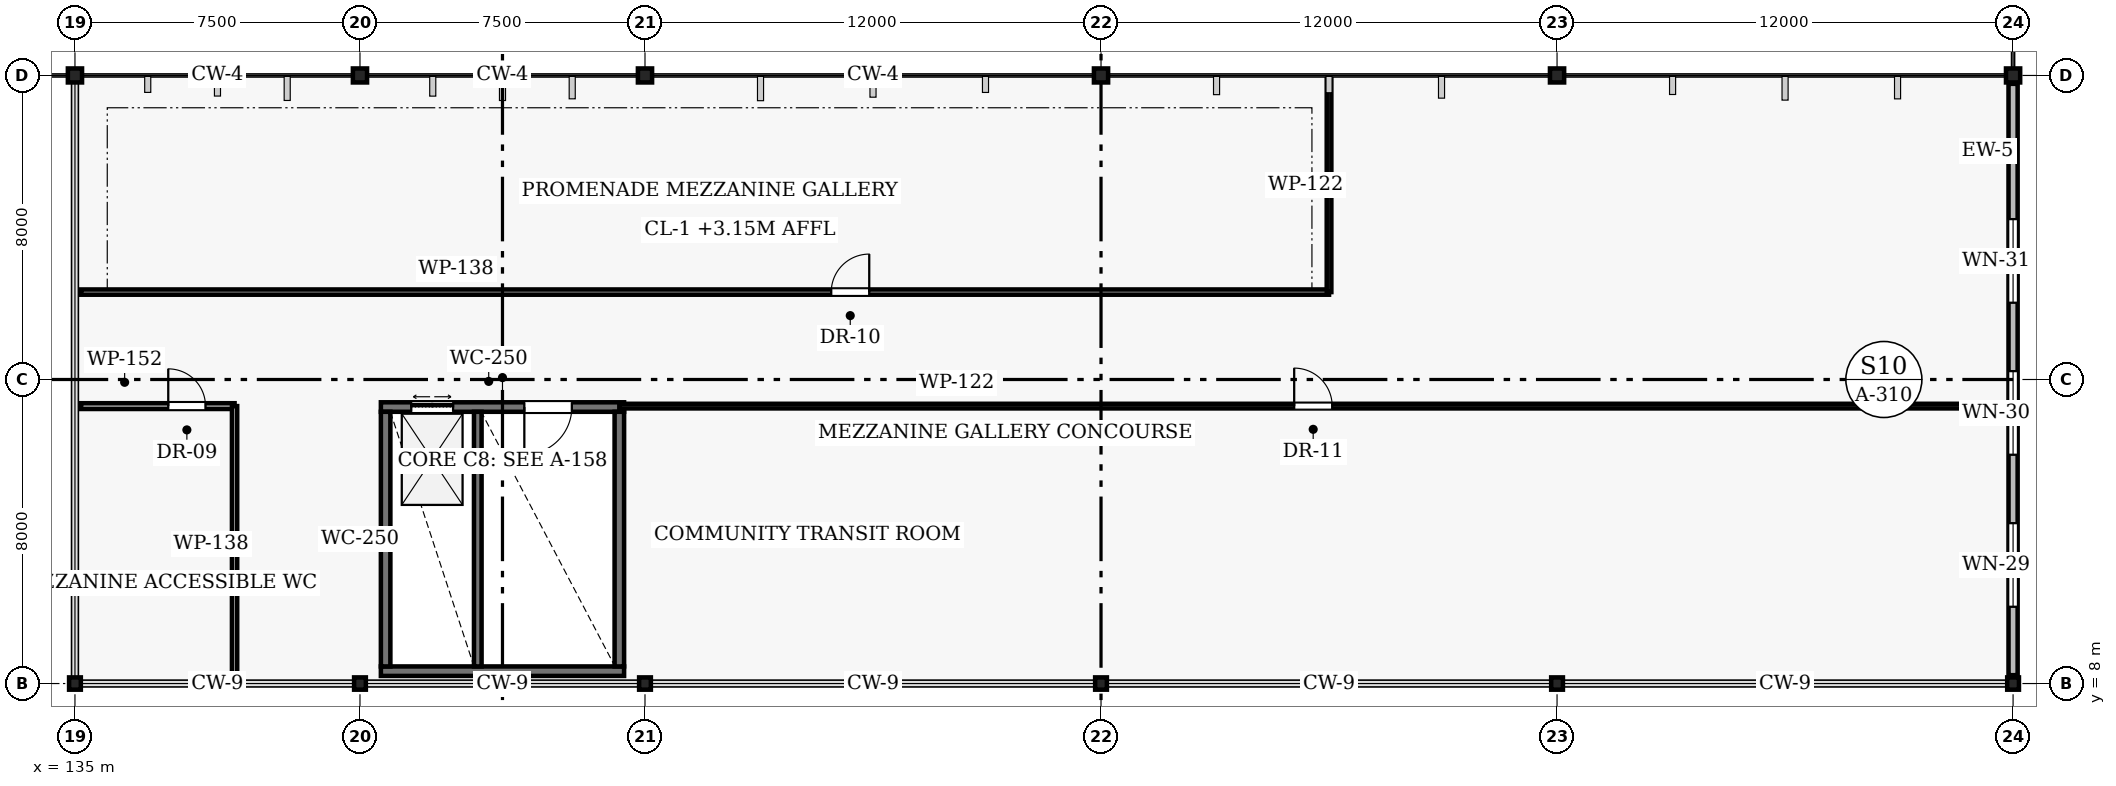
"""IFC4 building model, lengths in metres.
Left out: names, types, materials, properties, quantities, classifications, styles, units other than length and angle.
Written with IfcOpenShell. Run it as: python <this file> out.ifc"""

import sys

from ifc_helpers import new_model, si_unit, direction, frame, frame_2d, origin, origin_2d, place, context, subcontext, project, spatial, rectangle, i_section, extrude, element, fill, save


model = new_model("IFC4")
c1 = context("Model", 3, precision=1e-05, world=origin(), true_north=direction((0.0, 1.0)))
c2 = subcontext(c1, "Body", "Model", "MODEL_VIEW")
j1 = project(units=[si_unit("LENGTHUNIT", "METRE"), si_unit("PLANEANGLEUNIT", "RADIAN")], contexts=[c1])
p1 = place(None, origin())
s1 = spatial("IfcSite", under=j1, at=p1, CompositionType="ELEMENT")
p2 = place(p1, origin())
s2 = spatial("IfcBuilding", under=s1, at=p2, CompositionType="ELEMENT")
p3 = place(p2, frame((0.0, 0.0, 4.5)))
s3 = spatial("IfcBuildingStorey", under=s2, at=p3, CompositionType="ELEMENT", Elevation=4.5)
p4 = place(p3, frame((135.0, 8.0, 0.0), z_axis=(0.0, 0.0, 1.0), x_axis=(1.0, 0.0, 0.0)))
e1 = element("IfcColumn", 1, at=p4, inside=s3, PredefinedType="COLUMN", context=c2, shape_type="SweptSolid", body=[
    extrude(i_section(OverallWidth=0.309, OverallDepth=0.323, WebThickness=0.014, FlangeThickness=0.023, FilletRadius=0.015, at=origin_2d()), origin(), (0.0, 0.0, 1.0), 4.28),
])
p5 = place(p3, frame((135.0, 24.0, 0.0), z_axis=(0.0, 0.0, 1.0), x_axis=(1.0, 0.0, 0.0)))
e2 = element("IfcColumn", 2, at=p5, inside=s3, PredefinedType="COLUMN", context=c2, shape_type="SweptSolid", body=[
    extrude(i_section(OverallWidth=0.373, OverallDepth=0.368, WebThickness=0.015, FlangeThickness=0.024, FilletRadius=0.015, at=origin_2d()), origin(), (0.0, 0.0, 1.0), 4.5),
])
p6 = place(p3, frame((142.5, 8.0, 0.0), z_axis=(0.0, 0.0, 1.0), x_axis=(1.0, 0.0, 0.0)))
e3 = element("IfcColumn", 3, at=p6, inside=s3, PredefinedType="COLUMN", context=c2, shape_type="SweptSolid", body=[
    extrude(i_section(OverallWidth=0.309, OverallDepth=0.323, WebThickness=0.014, FlangeThickness=0.023, FilletRadius=0.015, at=origin_2d()), origin(), (0.0, 0.0, 1.0), 4.28),
])
p7 = place(p3, frame((142.5, 24.0, 0.0), z_axis=(0.0, 0.0, 1.0), x_axis=(1.0, 0.0, 0.0)))
e4 = element("IfcColumn", 4, at=p7, inside=s3, PredefinedType="COLUMN", context=c2, shape_type="SweptSolid", body=[
    extrude(i_section(OverallWidth=0.373, OverallDepth=0.368, WebThickness=0.015, FlangeThickness=0.024, FilletRadius=0.015, at=origin_2d()), origin(), (0.0, 0.0, 1.0), 4.5),
])
p8 = place(p3, frame((150.0, 8.0, 0.0), z_axis=(0.0, 0.0, 1.0), x_axis=(1.0, 0.0, 0.0)))
e5 = element("IfcColumn", 5, at=p8, inside=s3, PredefinedType="COLUMN", context=c2, shape_type="SweptSolid", body=[
    extrude(i_section(OverallWidth=0.309, OverallDepth=0.323, WebThickness=0.014, FlangeThickness=0.023, FilletRadius=0.015, at=origin_2d()), origin(), (0.0, 0.0, 1.0), 4.28),
])
p9 = place(p3, frame((150.0, 24.0, 0.0), z_axis=(0.0, 0.0, 1.0), x_axis=(1.0, 0.0, 0.0)))
e6 = element("IfcColumn", 6, at=p9, inside=s3, PredefinedType="COLUMN", context=c2, shape_type="SweptSolid", body=[
    extrude(i_section(OverallWidth=0.373, OverallDepth=0.368, WebThickness=0.015, FlangeThickness=0.024, FilletRadius=0.015, at=origin_2d()), origin(), (0.0, 0.0, 1.0), 4.5),
])
p10 = place(p3, frame((162.0, 8.0, 0.0), z_axis=(0.0, 0.0, 1.0), x_axis=(1.0, 0.0, 0.0)))
e7 = element("IfcColumn", 7, at=p10, inside=s3, PredefinedType="COLUMN", context=c2, shape_type="SweptSolid", body=[
    extrude(i_section(OverallWidth=0.309, OverallDepth=0.323, WebThickness=0.014, FlangeThickness=0.023, FilletRadius=0.015, at=origin_2d()), origin(), (0.0, 0.0, 1.0), 4.28),
])
p11 = place(p3, frame((162.0, 24.0, 0.0), z_axis=(0.0, 0.0, 1.0), x_axis=(1.0, 0.0, 0.0)))
e8 = element("IfcColumn", 8, at=p11, inside=s3, PredefinedType="COLUMN", context=c2, shape_type="SweptSolid", body=[
    extrude(i_section(OverallWidth=0.373, OverallDepth=0.368, WebThickness=0.015, FlangeThickness=0.024, FilletRadius=0.015, at=origin_2d()), origin(), (0.0, 0.0, 1.0), 4.5),
])
p12 = place(p3, frame((174.0, 8.0, 0.0), z_axis=(0.0, 0.0, 1.0), x_axis=(1.0, 0.0, 0.0)))
e9 = element("IfcColumn", 9, at=p12, inside=s3, PredefinedType="COLUMN", context=c2, shape_type="SweptSolid", body=[
    extrude(i_section(OverallWidth=0.309, OverallDepth=0.323, WebThickness=0.014, FlangeThickness=0.023, FilletRadius=0.015, at=origin_2d()), origin(), (0.0, 0.0, 1.0), 4.28),
])
p13 = place(p3, frame((174.0, 24.0, 0.0), z_axis=(0.0, 0.0, 1.0), x_axis=(1.0, 0.0, 0.0)))
e10 = element("IfcColumn", 10, at=p13, inside=s3, PredefinedType="COLUMN", context=c2, shape_type="SweptSolid", body=[
    extrude(i_section(OverallWidth=0.373, OverallDepth=0.368, WebThickness=0.015, FlangeThickness=0.024, FilletRadius=0.015, at=origin_2d()), origin(), (0.0, 0.0, 1.0), 4.5),
])
p14 = place(p3, frame((186.0, 8.0, 0.0), z_axis=(0.0, 0.0, 1.0), x_axis=(1.0, 0.0, 0.0)))
e11 = element("IfcColumn", 11, at=p14, inside=s3, PredefinedType="COLUMN", context=c2, shape_type="SweptSolid", body=[
    extrude(i_section(OverallWidth=0.309, OverallDepth=0.323, WebThickness=0.014, FlangeThickness=0.023, FilletRadius=0.015, at=origin_2d()), origin(), (0.0, 0.0, 1.0), 4.28),
])
p15 = place(p3, frame((186.0, 24.0, 0.0), z_axis=(0.0, 0.0, 1.0), x_axis=(1.0, 0.0, 0.0)))
e12 = element("IfcColumn", 12, at=p15, inside=s3, PredefinedType="COLUMN", context=c2, shape_type="SweptSolid", body=[
    extrude(i_section(OverallWidth=0.373, OverallDepth=0.368, WebThickness=0.015, FlangeThickness=0.024, FilletRadius=0.015, at=origin_2d()), origin(), (0.0, 0.0, 1.0), 4.5),
])
p16 = place(p3, frame((186.0, 8.22, 0.0), z_axis=(0.0, 0.0, 1.0), x_axis=(0.0, 1.0, 0.0)))
e13 = element("IfcWall", 13, at=p16, inside=s3, PredefinedType="SOLIDWALL", context=c2, shape_type="SweptSolid", body=[
    extrude(rectangle(XDim=15.56, YDim=0.24, at=frame_2d((7.78, 0.0))), origin(), (0.0, 0.0, 1.0), 3.581),
])
p17 = place(p16, frame((1.8, 0.0, 1.05)))
e14 = element("IfcOpeningElement", 14, at=p17, cuts=e13, PredefinedType="OPENING", context=c2, shape_type="SweptSolid", body=[
    extrude(rectangle(XDim=2.2, YDim=1.2, at=frame_2d((1.1, 0.6))), frame((0.0, 0.13, 0.0), z_axis=(0.0, -1.0, 0.0), x_axis=(1.0, 0.0, 0.0)), (0.0, 0.0, 1.0), 0.26),
])
p18 = place(p16, frame((5.8, 0.0, 1.05)))
e15 = element("IfcOpeningElement", 15, at=p18, cuts=e13, PredefinedType="OPENING", context=c2, shape_type="SweptSolid", body=[
    extrude(rectangle(XDim=2.2, YDim=1.5, at=frame_2d((1.1, 0.75))), frame((0.0, 0.13, 0.0), z_axis=(0.0, -1.0, 0.0), x_axis=(1.0, 0.0, 0.0)), (0.0, 0.0, 1.0), 0.26),
])
p19 = place(p16, frame((9.8, 0.0, 1.05)))
e16 = element("IfcOpeningElement", 16, at=p19, cuts=e13, PredefinedType="OPENING", context=c2, shape_type="SweptSolid", body=[
    extrude(rectangle(XDim=2.2, YDim=1.65, at=frame_2d((1.1, 0.825))), frame((0.0, 0.13, 0.0), z_axis=(0.0, -1.0, 0.0), x_axis=(1.0, 0.0, 0.0)), (0.0, 0.0, 1.0), 0.26),
])
p20 = place(p3, frame((143.05, 8.325, 0.0), z_axis=(0.0, 0.0, 1.0), x_axis=(1.0, 0.0, 0.0)))
e17 = element("IfcWall", 17, at=p20, inside=s3, PredefinedType="SHEAR", context=c2, shape_type="SweptSolid", body=[
    extrude(rectangle(XDim=6.4, YDim=0.25, at=frame_2d((3.2, 0.0))), origin(), (0.0, 0.0, 1.0), 3.65),
])
p21 = place(p3, frame((143.05, 15.275, 0.0), z_axis=(0.0, 0.0, 1.0), x_axis=(1.0, 0.0, 0.0)))
e18 = element("IfcWall", 18, at=p21, inside=s3, PredefinedType="SHEAR", context=c2, shape_type="SweptSolid", body=[
    extrude(rectangle(XDim=6.4, YDim=0.25, at=frame_2d((3.2, 0.0))), origin(), (0.0, 0.0, 1.0), 3.65),
])
p22 = place(p21, frame((0.8, 0.0, 0.0)))
e19 = element("IfcOpeningElement", 19, at=p22, cuts=e18, PredefinedType="OPENING", context=c2, shape_type="SweptSolid", body=[
    extrude(rectangle(XDim=1.1, YDim=2.15, at=frame_2d((0.55, 1.075))), frame((0.0, 0.135, 0.0), z_axis=(0.0, -1.0, 0.0), x_axis=(1.0, 0.0, 0.0)), (0.0, 0.0, 1.0), 0.27),
])
p23 = place(p21, frame((3.775, 0.0, 0.0)))
e20 = element("IfcOpeningElement", 20, at=p23, cuts=e18, PredefinedType="OPENING", context=c2, shape_type="SweptSolid", body=[
    extrude(rectangle(XDim=1.25, YDim=2.15, at=frame_2d((0.625, 1.075))), frame((0.0, 0.135, 0.0), z_axis=(0.0, -1.0, 0.0), x_axis=(1.0, 0.0, 0.0)), (0.0, 0.0, 1.0), 0.27),
])
for number, where, z_axis, x_axis in (
    (21, (143.175, 8.45, 0.0), (0.0, 0.0, 1.0), (0.0, 1.0, 0.0)),
    (22, (149.325, 8.45, 0.0), (0.0, 0.0, 1.0), (0.0, 1.0, 0.0)),
):
    element("IfcWall", number, at=place(p3, frame(where, z_axis=z_axis, x_axis=x_axis)), inside=s3, PredefinedType="SHEAR", context=c2, shape_type="SweptSolid", body=[
        extrude(rectangle(XDim=6.7, YDim=0.25, at=frame_2d((3.35, 0.0))), origin(), (0.0, 0.0, 1.0), 3.65),
    ])
p24 = place(p3, frame((145.6, 8.45, 0.0), z_axis=(0.0, 0.0, 1.0), x_axis=(0.0, 1.0, 0.0)))
e23 = element("IfcWall", 23, at=p24, inside=s3, PredefinedType="SHEAR", context=c2, shape_type="SweptSolid", body=[
    extrude(rectangle(XDim=6.7, YDim=0.2, at=frame_2d((3.35, 0.0))), origin(), (0.0, 0.0, 1.0), 3.65),
])
p25 = place(p3, frame((135.16, 15.3, 0.0), z_axis=(0.0, 0.0, 1.0), x_axis=(1.0, 0.0, 0.0)))
e24 = element("IfcWall", 24, at=p25, inside=s3, PredefinedType="PARTITIONING", context=c2, shape_type="SweptSolid", body=[
    extrude(rectangle(XDim=4.04, YDim=0.152, at=frame_2d((2.02, 0.0))), origin(), (0.0, 0.0, 1.0), 3.7),
])
p26 = place(p25, frame((2.295, 0.0, 0.0)))
e25 = element("IfcOpeningElement", 25, at=p26, cuts=e24, PredefinedType="OPENING", context=c2, shape_type="SweptSolid", body=[
    extrude(rectangle(XDim=0.98, YDim=2.12, at=frame_2d((0.49, 1.06))), frame((0.0, 0.086, 0.0), z_axis=(0.0, -1.0, 0.0), x_axis=(1.0, 0.0, 0.0)), (0.0, 0.0, 1.0), 0.172),
])
p27 = place(p3, frame((139.2, 8.05, 0.0), z_axis=(0.0, 0.0, 1.0), x_axis=(0.0, 1.0, 0.0)))
e26 = element("IfcWall", 26, at=p27, inside=s3, PredefinedType="PARTITIONING", context=c2, shape_type="SweptSolid", body=[
    extrude(rectangle(XDim=7.25, YDim=0.138, at=frame_2d((3.625, 0.0))), origin(), (0.0, 0.0, 1.0), 3.7),
])
p28 = place(p3, frame((135.16, 18.3, 0.0), z_axis=(0.0, 0.0, 1.0), x_axis=(1.0, 0.0, 0.0)))
e27 = element("IfcWall", 27, at=p28, inside=s3, PredefinedType="PARTITIONING", context=c2, shape_type="SweptSolid", body=[
    extrude(rectangle(XDim=32.84, YDim=0.138, at=frame_2d((16.42, 0.0))), origin(), (0.0, 0.0, 1.0), 3.7),
])
p29 = place(p28, frame((19.741, 0.0, 0.0)))
e28 = element("IfcOpeningElement", 28, at=p29, cuts=e27, PredefinedType="OPENING", context=c2, shape_type="SweptSolid", body=[
    extrude(rectangle(XDim=1.0, YDim=2.08, at=frame_2d((0.5, 1.04))), frame((0.0, 0.079, 0.0), z_axis=(0.0, -1.0, 0.0), x_axis=(1.0, 0.0, 0.0)), (0.0, 0.0, 1.0), 0.158),
])
p30 = place(p3, frame((168.0, 18.3, 0.0), z_axis=(0.0, 0.0, 1.0), x_axis=(0.0, 1.0, 0.0)))
e29 = element("IfcWall", 29, at=p30, inside=s3, PredefinedType="PARTITIONING", context=c2, shape_type="SweptSolid", body=[
    extrude(rectangle(XDim=5.62, YDim=0.122, at=frame_2d((2.81, 0.0))), origin(), (0.0, 0.0, 1.0), 3.7),
])
p31 = place(p3, frame((149.325, 15.3, 0.0), z_axis=(0.0, 0.0, 1.0), x_axis=(1.0, 0.0, 0.0)))
e30 = element("IfcWall", 30, at=p31, inside=s3, PredefinedType="PARTITIONING", context=c2, shape_type="SweptSolid", body=[
    extrude(rectangle(XDim=36.515, YDim=0.122, at=frame_2d((18.258, 0.0))), origin(), (0.0, 0.0, 1.0), 3.7),
])
p32 = place(p31, frame((17.758, 0.0, 0.0)))
e31 = element("IfcOpeningElement", 31, at=p32, cuts=e30, PredefinedType="OPENING", context=c2, shape_type="SweptSolid", body=[
    extrude(rectangle(XDim=1.0, YDim=2.14, at=frame_2d((0.5, 1.07))), frame((0.0, 0.071, 0.0), z_axis=(0.0, -1.0, 0.0), x_axis=(1.0, 0.0, 0.0)), (0.0, 0.0, 1.0), 0.142),
])
p33 = place(p17, origin())
e32 = element("IfcWindow", 32, at=p33, inside=s3, PartitioningType="SINGLE_PANEL", PredefinedType="WINDOW", context=c2, shape_type="SweptSolid", body=[
    extrude(rectangle(XDim=2.2, YDim=1.2, at=frame_2d((1.1, 0.6))), frame((0.0, 0.03, 0.0), z_axis=(0.0, -1.0, 0.0), x_axis=(1.0, 0.0, 0.0)), (0.0, 0.0, 1.0), 0.06),
])
fill(e14, e32)
p34 = place(p18, origin())
e33 = element("IfcWindow", 33, at=p34, inside=s3, PartitioningType="SINGLE_PANEL", PredefinedType="WINDOW", context=c2, shape_type="SweptSolid", body=[
    extrude(rectangle(XDim=2.2, YDim=1.5, at=frame_2d((1.1, 0.75))), frame((0.0, 0.03, 0.0), z_axis=(0.0, -1.0, 0.0), x_axis=(1.0, 0.0, 0.0)), (0.0, 0.0, 1.0), 0.06),
])
fill(e15, e33)
p35 = place(p19, origin())
e34 = element("IfcWindow", 34, at=p35, inside=s3, PartitioningType="SINGLE_PANEL", PredefinedType="WINDOW", context=c2, shape_type="SweptSolid", body=[
    extrude(rectangle(XDim=2.2, YDim=1.65, at=frame_2d((1.1, 0.825))), frame((0.0, 0.03, 0.0), z_axis=(0.0, -1.0, 0.0), x_axis=(1.0, 0.0, 0.0)), (0.0, 0.0, 1.0), 0.06),
])
fill(e16, e34)
p36 = place(p22, origin())
e35 = element("IfcDoor", 35, at=p36, inside=s3, OperationType="DOUBLE_DOOR_SLIDING", PredefinedType="DOOR", context=c2, shape_type="SweptSolid", body=[
    extrude(rectangle(XDim=1.1, YDim=2.15, at=frame_2d((0.55, 1.075))), frame((0.0, 0.025, 0.0), z_axis=(0.0, -1.0, 0.0), x_axis=(1.0, 0.0, 0.0)), (0.0, 0.0, 1.0), 0.05),
])
fill(e19, e35)
p37 = place(p23, frame((1.25, 0.0, 0.0), z_axis=(0.0, 0.0, 1.0), x_axis=(-1.0, 0.0, 0.0)))
e36 = element("IfcDoor", 36, at=p37, inside=s3, OperationType="SINGLE_SWING_RIGHT", PredefinedType="DOOR", context=c2, shape_type="SweptSolid", body=[
    extrude(rectangle(XDim=1.25, YDim=2.15, at=frame_2d((0.625, 1.075))), frame((0.0, 0.025, 0.0), z_axis=(0.0, -1.0, 0.0), x_axis=(1.0, 0.0, 0.0)), (0.0, 0.0, 1.0), 0.05),
])
fill(e20, e36)
p38 = place(p26, origin())
e37 = element("IfcDoor", 37, at=p38, inside=s3, OperationType="SINGLE_SWING_LEFT", PredefinedType="DOOR", context=c2, shape_type="SweptSolid", body=[
    extrude(rectangle(XDim=0.98, YDim=2.12, at=frame_2d((0.49, 1.06))), frame((0.0, 0.025, 0.0), z_axis=(0.0, -1.0, 0.0), x_axis=(1.0, 0.0, 0.0)), (0.0, 0.0, 1.0), 0.05),
])
fill(e25, e37)
p39 = place(p29, origin())
e38 = element("IfcDoor", 38, at=p39, inside=s3, OperationType="SINGLE_SWING_RIGHT", PredefinedType="DOOR", context=c2, shape_type="SweptSolid", body=[
    extrude(rectangle(XDim=1.0, YDim=2.08, at=frame_2d((0.5, 1.04))), frame((0.0, 0.025, 0.0), z_axis=(0.0, -1.0, 0.0), x_axis=(1.0, 0.0, 0.0)), (0.0, 0.0, 1.0), 0.05),
])
fill(e28, e38)
p40 = place(p32, origin())
e39 = element("IfcDoor", 39, at=p40, inside=s3, OperationType="SINGLE_SWING_LEFT", PredefinedType="DOOR", context=c2, shape_type="SweptSolid", body=[
    extrude(rectangle(XDim=1.0, YDim=2.14, at=frame_2d((0.5, 1.07))), frame((0.0, 0.025, 0.0), z_axis=(0.0, -1.0, 0.0), x_axis=(1.0, 0.0, 0.0)), (0.0, 0.0, 1.0), 0.05),
])
fill(e31, e39)
save(model, sys.argv[1])
